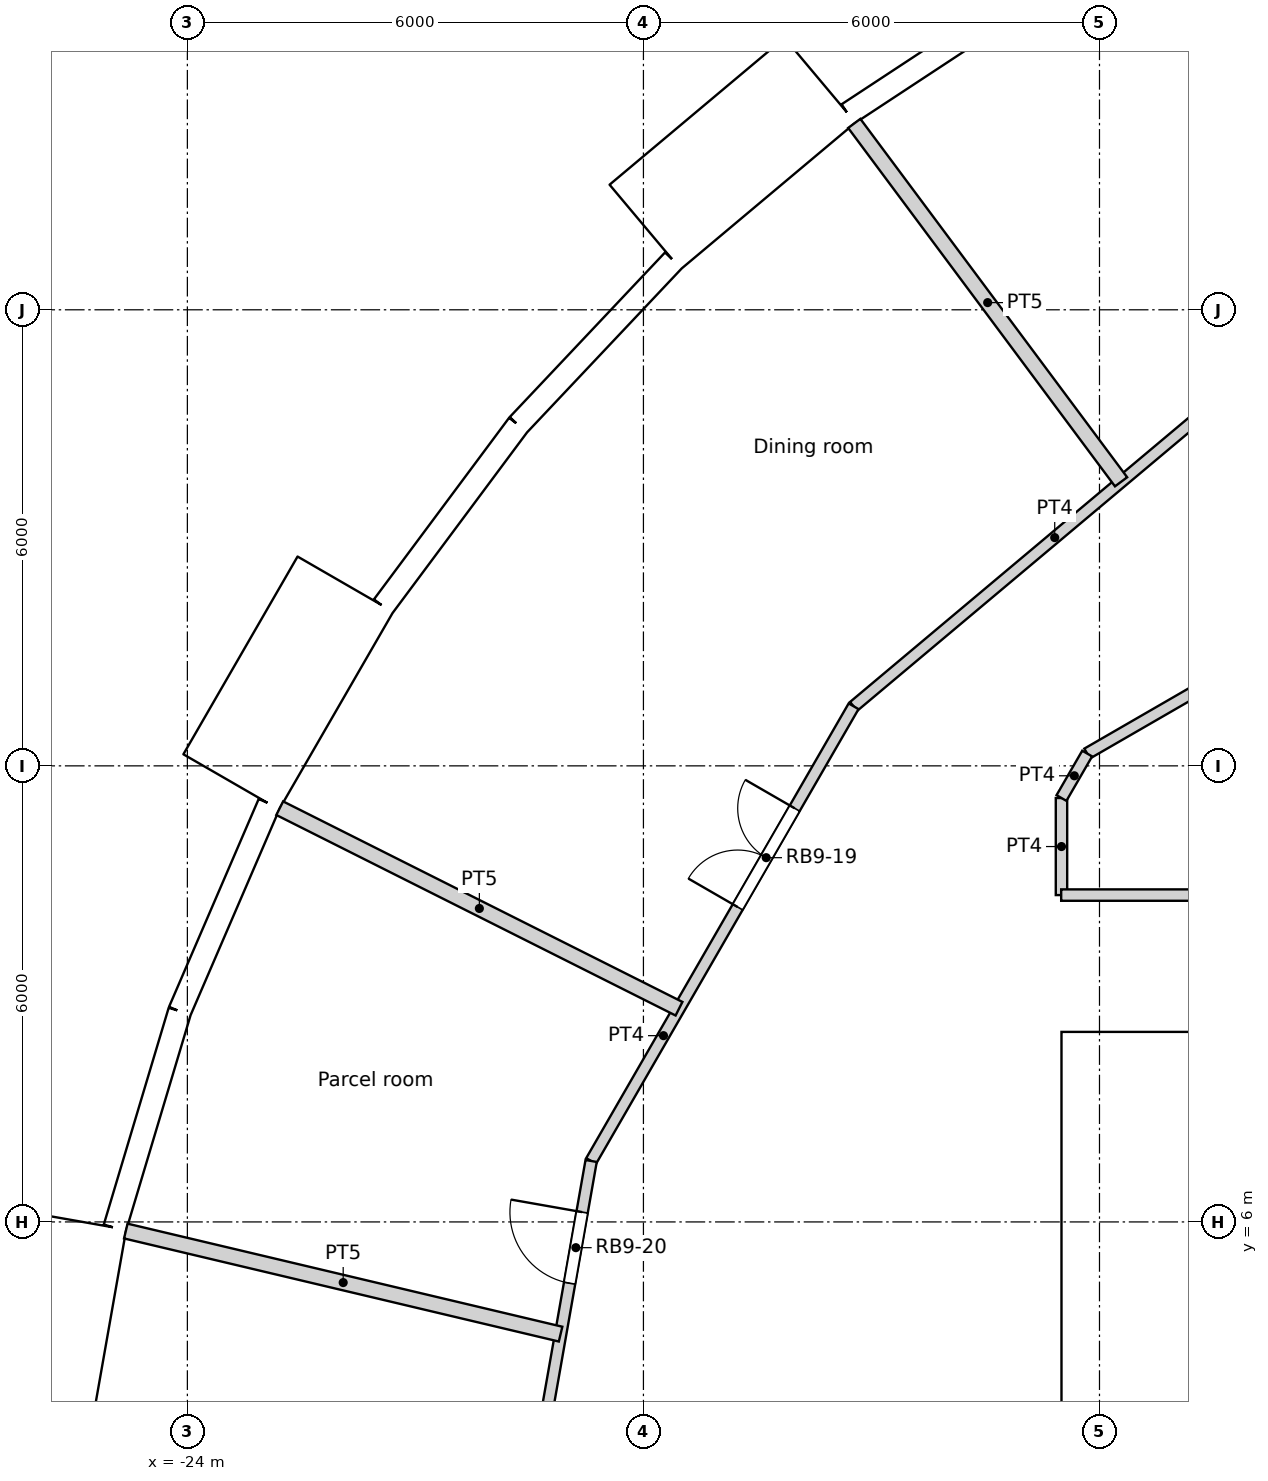
"""IFC4 building model, lengths in metres.
Left out: names, types, materials, properties, quantities, classifications, styles, units other than length and angle.
Written with IfcOpenShell. Run it as: python <this file> out.ifc"""

import sys

from ifc_helpers import new_model, si_unit, direction, frame, frame_2d, origin, origin_2d, place, context, subcontext, project, spatial, rectangle, circle, extrude, element, fill, save


model = new_model("IFC4")
c1 = context("Model", 3, precision=1e-05, world=origin(), true_north=direction((0.0, 1.0)))
c2 = subcontext(c1, "Body", "Model", "MODEL_VIEW")
j1 = project(units=[si_unit("LENGTHUNIT", "METRE"), si_unit("PLANEANGLEUNIT", "RADIAN")], contexts=[c1])
p1 = place(None, origin())
s1 = spatial("IfcSite", under=j1, at=p1, CompositionType="ELEMENT")
p2 = place(p1, origin())
s2 = spatial("IfcBuilding", under=s1, at=p2, CompositionType="ELEMENT")
p3 = place(p2, frame((0.0, 0.0, 212.4)))
s3 = spatial("IfcBuildingStorey", under=s2, at=p3, CompositionType="ELEMENT", Elevation=212.4)
for number, where, z_axis, x_axis in (
    (1, (-12.274, 21.259, 0.0), (0.0, 0.0, 1.0), (1.0, 0.0, 0.0)),
    (2, (-16.846, 17.855, 0.0), (0.0, 0.0, 1.0), (1.0, 0.0, 0.0)),
    (3, (-20.509, 13.489, 0.0), (0.0, 0.0, 1.0), (1.0, 0.0, 0.0)),
    (4, (-23.067, 8.396, 0.0), (0.0, 0.0, 1.0), (1.0, 0.0, 0.0)),
):
    element("IfcColumn", number, at=place(p3, frame(where, z_axis=z_axis, x_axis=x_axis)), inside=s3, PredefinedType="COLUMN", context=c2, shape_type="SweptSolid", body=[
        extrude(circle(Radius=0.6, at=origin_2d()), origin(), (0.0, 0.0, 1.0), 3.6),
    ])
for number, where, z_axis, x_axis in (
    (5, (-13.798, 12.802, 0.0), (0.0, 0.0, 1.0), (1.0, 0.0, 0.0)),
    (6, (-16.958, 8.167, 0.0), (0.0, 0.0, 1.0), (1.0, 0.0, 0.0)),
):
    element("IfcColumn", number, at=place(p3, frame(where, z_axis=z_axis, x_axis=x_axis)), inside=s3, PredefinedType="COLUMN", context=c2, shape_type="SweptSolid", body=[
        extrude(circle(Radius=0.65, at=origin_2d()), origin(), (0.0, 0.0, 1.0), 3.6),
    ])
p4 = place(p3, frame((-12.824, 22.211, 0.0), z_axis=(0.0, 0.0, 1.0), x_axis=(-0.835470659512, -0.549535055382, 0.0)))
e7 = element("IfcWall", 7, at=p4, inside=s3, PredefinedType="SOLIDWALL", context=c2, shape_type="SweptSolid", body=[
    extrude(rectangle(XDim=2.973, YDim=0.3, at=frame_2d((1.487, 0.0))), origin(), (0.0, 0.0, 1.0), 3.3),
])
p5 = place(p4, frame((1.486, 0.0, 1.55)))
e8 = element("IfcOpeningElement", 8, at=p5, cuts=e7, PredefinedType="OPENING", context=c2, shape_type="SweptSolid", body=[
    extrude(circle(Radius=0.9, at=origin_2d()), frame((0.0, 0.16, 0.0), z_axis=(0.0, -1.0, 0.0), x_axis=(1.0, 0.0, 0.0)), (0.0, 0.0, 1.0), 0.32),
])
p6 = place(p3, frame((-15.678, 21.019, -0.3), z_axis=(0.0, 0.0, 1.0), x_axis=(-0.766022196139, -0.642814121673, 0.0)))
e9 = element("IfcWall", 9, at=p6, inside=s3, PredefinedType="ELEMENTEDWALL", context=c2, shape_type="SweptSolid", body=[
    extrude(rectangle(XDim=3.0, YDim=1.45, at=frame_2d((1.5, 0.0))), origin(), (0.0, 0.0, 1.0), 3.6),
])
p7 = place(p6, frame((1.5, 0.0, 1.85)))
e10 = element("IfcOpeningElement", 10, at=p7, cuts=e9, PredefinedType="OPENING", context=c2, shape_type="SweptSolid", body=[
    extrude(circle(Radius=0.9, at=origin_2d()), frame((0.0, 0.735, 0.0), z_axis=(0.0, -1.0, 0.0), x_axis=(1.0, 0.0, 0.0)), (0.0, 0.0, 1.0), 1.47),
])
p8 = place(p3, frame((-17.607, 18.648, 0.0), z_axis=(0.0, 0.0, 1.0), x_axis=(-0.686235184166, -0.727379730273, 0.0)))
e11 = element("IfcWall", 11, at=p8, inside=s3, PredefinedType="SOLIDWALL", context=c2, shape_type="SweptSolid", body=[
    extrude(rectangle(XDim=2.973, YDim=0.3, at=frame_2d((1.486, 0.0))), origin(), (0.0, 0.0, 1.0), 3.3),
])
p9 = place(p8, frame((1.486, 0.0, 1.55)))
e12 = element("IfcOpeningElement", 12, at=p9, cuts=e11, PredefinedType="OPENING", context=c2, shape_type="SweptSolid", body=[
    extrude(circle(Radius=0.9, at=origin_2d()), frame((0.0, 0.16, 0.0), z_axis=(0.0, -1.0, 0.0), x_axis=(1.0, 0.0, 0.0)), (0.0, 0.0, 1.0), 0.32),
])
p10 = place(p3, frame((-19.647, 16.486, 0.0), z_axis=(0.0, 0.0, 1.0), x_axis=(-0.597197580538, -0.80209416517, 0.0)))
e13 = element("IfcWall", 13, at=p10, inside=s3, PredefinedType="SOLIDWALL", context=c2, shape_type="SweptSolid", body=[
    extrude(rectangle(XDim=2.973, YDim=0.3, at=frame_2d((1.486, 0.0))), origin(), (0.0, 0.0, 1.0), 3.3),
])
p11 = place(p10, frame((1.486, 0.0, 1.55)))
e14 = element("IfcOpeningElement", 14, at=p11, cuts=e13, PredefinedType="OPENING", context=c2, shape_type="SweptSolid", body=[
    extrude(circle(Radius=0.9, at=origin_2d()), frame((0.0, 0.16, 0.0), z_axis=(0.0, -1.0, 0.0), x_axis=(1.0, 0.0, 0.0)), (0.0, 0.0, 1.0), 0.32),
])
p12 = place(p3, frame((-21.922, 14.389, -0.3), z_axis=(0.0, 0.0, 1.0), x_axis=(-0.499990139034, -0.866031096941, 0.0)))
e15 = element("IfcWall", 15, at=p12, inside=s3, PredefinedType="ELEMENTEDWALL", context=c2, shape_type="SweptSolid", body=[
    extrude(rectangle(XDim=3.0, YDim=1.45, at=frame_2d((1.5, 0.0))), origin(), (0.0, 0.0, 1.0), 3.6),
])
p13 = place(p12, frame((1.5, 0.0, 1.85)))
e16 = element("IfcOpeningElement", 16, at=p13, cuts=e15, PredefinedType="OPENING", context=c2, shape_type="SweptSolid", body=[
    extrude(circle(Radius=0.9, at=origin_2d()), frame((0.0, 0.735, 0.0), z_axis=(0.0, -1.0, 0.0), x_axis=(1.0, 0.0, 0.0)), (0.0, 0.0, 1.0), 1.47),
])
p14 = place(p3, frame((-22.923, 11.502, 0.0), z_axis=(0.0, 0.0, 1.0), x_axis=(-0.396148129016, -0.918186614952, 0.0)))
e17 = element("IfcWall", 17, at=p14, inside=s3, PredefinedType="SOLIDWALL", context=c2, shape_type="SweptSolid", body=[
    extrude(rectangle(XDim=2.973, YDim=0.3, at=frame_2d((1.486, 0.0))), origin(), (0.0, 0.0, 1.0), 3.3),
])
p15 = place(p14, frame((1.486, 0.0, 1.55)))
e18 = element("IfcOpeningElement", 18, at=p15, cuts=e17, PredefinedType="OPENING", context=c2, shape_type="SweptSolid", body=[
    extrude(circle(Radius=0.9, at=origin_2d()), frame((0.0, 0.16, 0.0), z_axis=(0.0, -1.0, 0.0), x_axis=(1.0, 0.0, 0.0)), (0.0, 0.0, 1.0), 0.32),
])
p16 = place(p3, frame((-24.101, 8.772, 0.0), z_axis=(0.0, 0.0, 1.0), x_axis=(-0.286782750849, -0.957995643944, 0.0)))
e19 = element("IfcWall", 19, at=p16, inside=s3, PredefinedType="SOLIDWALL", context=c2, shape_type="SweptSolid", body=[
    extrude(rectangle(XDim=2.973, YDim=0.3, at=frame_2d((1.486, 0.0))), origin(), (0.0, 0.0, 1.0), 3.3),
])
p17 = place(p16, frame((1.486, 0.0, 1.55)))
e20 = element("IfcOpeningElement", 20, at=p17, cuts=e19, PredefinedType="OPENING", context=c2, shape_type="SweptSolid", body=[
    extrude(circle(Radius=0.9, at=origin_2d()), frame((0.0, 0.16, 0.0), z_axis=(0.0, -1.0, 0.0), x_axis=(1.0, 0.0, 0.0)), (0.0, 0.0, 1.0), 0.32),
])
p18 = place(p3, frame((-25.521, 6.023, -0.3), z_axis=(0.0, 0.0, 1.0), x_axis=(-0.173669267716, -0.984804034035, 0.0)))
e21 = element("IfcWall", 21, at=p18, inside=s3, PredefinedType="ELEMENTEDWALL", context=c2, shape_type="SweptSolid", body=[
    extrude(rectangle(XDim=3.0, YDim=1.45, at=frame_2d((1.5, 0.0))), origin(), (0.0, 0.0, 1.0), 3.6),
])
p19 = place(p18, frame((1.5, 0.0, 1.85)))
e22 = element("IfcOpeningElement", 22, at=p19, cuts=e21, PredefinedType="OPENING", context=c2, shape_type="SweptSolid", body=[
    extrude(circle(Radius=0.9, at=origin_2d()), frame((0.0, 0.735, 0.0), z_axis=(0.0, -1.0, 0.0), x_axis=(1.0, 0.0, 0.0)), (0.0, 0.0, 1.0), 1.47),
])
p20 = place(p3, frame((-12.5, 8.05, 0.0), z_axis=(0.0, 0.0, 1.0), x_axis=(1.0, 0.0, 0.0)))
e23 = element("IfcWall", 23, at=p20, inside=s3, PredefinedType="SOLIDWALL", context=c2, shape_type="SweptSolid", body=[
    extrude(rectangle(XDim=25.0, YDim=0.9, at=frame_2d((12.5, 0.0))), origin(), (0.0, 0.0, 1.0), 3.6),
])
p21 = place(p20, frame((8.3, 0.0, 0.0)))
e24 = element("IfcOpeningElement", 24, at=p21, cuts=e23, PredefinedType="OPENING", context=c2, shape_type="SweptSolid", body=[
    extrude(rectangle(XDim=1.8, YDim=2.1, at=frame_2d((0.9, 1.05))), frame((0.0, 0.45, 0.0), z_axis=(0.0, -1.0, 0.0), x_axis=(1.0, 0.0, 0.0)), (0.0, 0.0, 1.0), 0.9),
])
p22 = place(p3, frame((-12.05, -7.6, 0.0), z_axis=(0.0, 0.0, 1.0), x_axis=(0.0, 1.0, 0.0)))
e25 = element("IfcWall", 25, at=p22, inside=s3, PredefinedType="SOLIDWALL", context=c2, shape_type="SweptSolid", body=[
    extrude(rectangle(XDim=15.2, YDim=0.9, at=frame_2d((7.6, 0.0))), origin(), (0.0, 0.0, 1.0), 3.6),
])
p23 = place(p22, frame((7.1, 0.0, 0.0)))
e26 = element("IfcOpeningElement", 26, at=p23, cuts=e25, PredefinedType="OPENING", context=c2, shape_type="SweptSolid", body=[
    extrude(rectangle(XDim=1.0, YDim=2.1, at=frame_2d((0.5, 1.05))), frame((0.0, 0.45, 0.0), z_axis=(0.0, -1.0, 0.0), x_axis=(1.0, 0.0, 0.0)), (0.0, 0.0, 1.0), 0.9),
])
p24 = place(p3, frame((-11.6, 4.55, 0.0), z_axis=(0.0, 0.0, 1.0), x_axis=(1.0, 0.0, 0.0)))
e27 = element("IfcWall", 27, at=p24, inside=s3, PredefinedType="SOLIDWALL", context=c2, shape_type="SweptSolid", body=[
    extrude(rectangle(XDim=2.4, YDim=0.3, at=frame_2d((1.2, 0.0))), origin(), (0.0, 0.0, 1.0), 3.3),
])
p25 = place(p24, frame((0.65, 0.0, 0.0)))
e28 = element("IfcOpeningElement", 28, at=p25, cuts=e27, PredefinedType="OPENING", context=c2, shape_type="SweptSolid", body=[
    extrude(rectangle(XDim=1.1, YDim=2.1, at=frame_2d((0.55, 1.05))), frame((0.0, 0.15, 0.0), z_axis=(0.0, -1.0, 0.0), x_axis=(1.0, 0.0, 0.0)), (0.0, 0.0, 1.0), 0.3),
])
p26 = place(p3, frame((-12.504, 10.3, 0.0), z_axis=(0.0, 0.0, 1.0), x_axis=(1.0, 0.0, 0.0)))
e29 = element("IfcWall", 29, at=p26, inside=s3, PredefinedType="PARTITIONING", context=c2, shape_type="SweptSolid", body=[
    extrude(rectangle(XDim=7.687, YDim=0.15, at=frame_2d((3.844, 0.0))), origin(), (0.0, 0.0, 1.0), 3.15),
])
p27 = place(p3, frame((-12.162, 12.162, 0.0), z_axis=(0.0, 0.0, 1.0), x_axis=(0.866004766557, 0.500035743023, 0.0)))
e30 = element("IfcWall", 30, at=p27, inside=s3, PredefinedType="PARTITIONING", context=c2, shape_type="SweptSolid", body=[
    extrude(rectangle(XDim=8.477, YDim=0.15, at=frame_2d((4.239, 0.0))), origin(), (0.0, 0.0, 1.0), 3.15),
])
p28 = place(p27, frame((3.739, 0.0, 0.0)))
e31 = element("IfcOpeningElement", 31, at=p28, cuts=e30, PredefinedType="OPENING", context=c2, shape_type="SweptSolid", body=[
    extrude(rectangle(XDim=1.0, YDim=2.04, at=frame_2d((0.5, 1.02))), frame((0.0, 0.075, 0.0), z_axis=(0.0, -1.0, 0.0), x_axis=(1.0, 0.0, 0.0)), (0.0, 0.0, 1.0), 0.15),
])
p29 = place(p3, frame((-15.234, 12.783, 0.0), z_axis=(0.0, 0.0, 1.0), x_axis=(0.765936018543, 0.642916802937, 0.0)))
e32 = element("IfcWall", 32, at=p29, inside=s3, PredefinedType="PARTITIONING", context=c2, shape_type="SweptSolid", body=[
    extrude(rectangle(XDim=6.906, YDim=0.15, at=frame_2d((3.453, 0.0))), origin(), (0.0, 0.0, 1.0), 3.15),
])
p30 = place(p3, frame((-12.5, 11.577, 0.0), z_axis=(0.0, 0.0, 1.0), x_axis=(0.500024767483, 0.866011103799, 0.0)))
e33 = element("IfcWall", 33, at=p30, inside=s3, PredefinedType="PARTITIONING", context=c2, shape_type="SweptSolid", body=[
    extrude(rectangle(XDim=0.676, YDim=0.15, at=frame_2d((0.338, 0.0))), origin(), (0.0, 0.0, 1.0), 3.15),
])
p31 = place(p3, frame((-12.5, 10.3, 0.0), z_axis=(0.0, 0.0, 1.0), x_axis=(0.0, 1.0, 0.0)))
e34 = element("IfcWall", 34, at=p31, inside=s3, PredefinedType="PARTITIONING", context=c2, shape_type="SweptSolid", body=[
    extrude(rectangle(XDim=1.277, YDim=0.15, at=frame_2d((0.638, 0.0))), origin(), (0.0, 0.0, 1.0), 3.15),
])
p32 = place(p3, frame((-18.688, 6.802, 0.0), z_axis=(0.0, 0.0, 1.0), x_axis=(0.499914202267, 0.866074933462, 0.0)))
e35 = element("IfcWall", 35, at=p32, inside=s3, PredefinedType="PARTITIONING", context=c2, shape_type="SweptSolid", body=[
    extrude(rectangle(XDim=6.907, YDim=0.15, at=frame_2d((3.454, 0.0))), origin(), (0.0, 0.0, 1.0), 3.15),
])
p33 = place(p32, frame((3.857, 0.0, 0.0)))
e36 = element("IfcOpeningElement", 36, at=p33, cuts=e35, PredefinedType="OPENING", context=c2, shape_type="SweptSolid", body=[
    extrude(rectangle(XDim=1.5, YDim=2.1, at=frame_2d((0.75, 1.05))), frame((0.0, 0.075, 0.0), z_axis=(0.0, -1.0, 0.0), x_axis=(1.0, 0.0, 0.0)), (0.0, 0.0, 1.0), 0.15),
])
p34 = place(p3, frame((-19.886, -0.0, 0.0), z_axis=(0.0, 0.0, 1.0), x_axis=(0.173482860149, 0.984836888644, 0.0)))
e37 = element("IfcWall", 37, at=p34, inside=s3, PredefinedType="PARTITIONING", context=c2, shape_type="SweptSolid", body=[
    extrude(rectangle(XDim=6.907, YDim=0.15, at=frame_2d((3.454, 0.0))), origin(), (0.0, 0.0, 1.0), 3.15),
])
p35 = place(p34, frame((5.274, 0.0, 0.0)))
e38 = element("IfcOpeningElement", 38, at=p35, cuts=e37, PredefinedType="OPENING", context=c2, shape_type="SweptSolid", body=[
    extrude(rectangle(XDim=0.95, YDim=2.1, at=frame_2d((0.475, 1.05))), frame((0.0, 0.075, 0.0), z_axis=(0.0, -1.0, 0.0), x_axis=(1.0, 0.0, 0.0)), (0.0, 0.0, 1.0), 0.15),
])
p36 = place(p3, frame((-15.226, 20.452, 0.0), z_axis=(0.0, 0.0, 1.0), x_axis=(0.597151875745, -0.802128192557, 0.0)))
e39 = element("IfcWall", 39, at=p36, inside=s3, PredefinedType="PARTITIONING", context=c2, shape_type="SweptSolid", body=[
    extrude(rectangle(XDim=5.878, YDim=0.2, at=frame_2d((2.939, 0.0))), origin(), (0.0, 0.0, 1.0), 3.15),
])
p37 = place(p3, frame((-22.785, 11.443, 0.0), z_axis=(0.0, 0.0, 1.0), x_axis=(0.893628331628, -0.448807759415, 0.0)))
e40 = element("IfcWall", 40, at=p37, inside=s3, PredefinedType="PARTITIONING", context=c2, shape_type="SweptSolid", body=[
    extrude(rectangle(XDim=5.878, YDim=0.2, at=frame_2d((2.939, 0.0))), origin(), (0.0, 0.0, 1.0), 3.15),
])
p38 = place(p3, frame((-24.81, 5.88, 0.0), z_axis=(0.0, 0.0, 1.0), x_axis=(0.973033452951, -0.230664040193, 0.0)))
e41 = element("IfcWall", 41, at=p38, inside=s3, PredefinedType="PARTITIONING", context=c2, shape_type="SweptSolid", body=[
    extrude(rectangle(XDim=5.878, YDim=0.2, at=frame_2d((2.939, 0.0))), origin(), (0.0, 0.0, 1.0), 3.15),
])
p39 = place(p5, origin())
e42 = element("IfcWindow", 42, at=p39, inside=s3, PartitioningType="SINGLE_PANEL", PredefinedType="WINDOW", context=c2, shape_type="SweptSolid", body=[
    extrude(circle(Radius=0.9, at=origin_2d()), frame((0.0, 0.12, 0.0), z_axis=(0.0, -1.0, 0.0), x_axis=(1.0, 0.0, 0.0)), (0.0, 0.0, 1.0), 0.1),
])
fill(e8, e42)
p40 = place(p7, origin())
e43 = element("IfcWindow", 43, at=p40, inside=s3, PartitioningType="SINGLE_PANEL", PredefinedType="WINDOW", context=c2, shape_type="SweptSolid", body=[
    extrude(circle(Radius=0.9, at=origin_2d()), frame((0.0, 0.695, 0.0), z_axis=(0.0, -1.0, 0.0), x_axis=(1.0, 0.0, 0.0)), (0.0, 0.0, 1.0), 0.1),
])
fill(e10, e43)
p41 = place(p9, origin())
e44 = element("IfcWindow", 44, at=p41, inside=s3, PartitioningType="SINGLE_PANEL", PredefinedType="WINDOW", context=c2, shape_type="SweptSolid", body=[
    extrude(circle(Radius=0.9, at=origin_2d()), frame((0.0, 0.12, 0.0), z_axis=(0.0, -1.0, 0.0), x_axis=(1.0, 0.0, 0.0)), (0.0, 0.0, 1.0), 0.1),
])
fill(e12, e44)
p42 = place(p11, origin())
e45 = element("IfcWindow", 45, at=p42, inside=s3, PartitioningType="SINGLE_PANEL", PredefinedType="WINDOW", context=c2, shape_type="SweptSolid", body=[
    extrude(circle(Radius=0.9, at=origin_2d()), frame((0.0, 0.12, 0.0), z_axis=(0.0, -1.0, 0.0), x_axis=(1.0, 0.0, 0.0)), (0.0, 0.0, 1.0), 0.1),
])
fill(e14, e45)
p43 = place(p13, origin())
e46 = element("IfcWindow", 46, at=p43, inside=s3, PartitioningType="SINGLE_PANEL", PredefinedType="WINDOW", context=c2, shape_type="SweptSolid", body=[
    extrude(circle(Radius=0.9, at=origin_2d()), frame((0.0, 0.695, 0.0), z_axis=(0.0, -1.0, 0.0), x_axis=(1.0, 0.0, 0.0)), (0.0, 0.0, 1.0), 0.1),
])
fill(e16, e46)
p44 = place(p15, origin())
e47 = element("IfcWindow", 47, at=p44, inside=s3, PartitioningType="SINGLE_PANEL", PredefinedType="WINDOW", context=c2, shape_type="SweptSolid", body=[
    extrude(circle(Radius=0.9, at=origin_2d()), frame((0.0, 0.12, 0.0), z_axis=(0.0, -1.0, 0.0), x_axis=(1.0, 0.0, 0.0)), (0.0, 0.0, 1.0), 0.1),
])
fill(e18, e47)
p45 = place(p17, origin())
e48 = element("IfcWindow", 48, at=p45, inside=s3, PartitioningType="SINGLE_PANEL", PredefinedType="WINDOW", context=c2, shape_type="SweptSolid", body=[
    extrude(circle(Radius=0.9, at=origin_2d()), frame((0.0, 0.12, 0.0), z_axis=(0.0, -1.0, 0.0), x_axis=(1.0, 0.0, 0.0)), (0.0, 0.0, 1.0), 0.1),
])
fill(e20, e48)
p46 = place(p19, origin())
e49 = element("IfcWindow", 49, at=p46, inside=s3, PartitioningType="SINGLE_PANEL", PredefinedType="WINDOW", context=c2, shape_type="SweptSolid", body=[
    extrude(circle(Radius=0.9, at=origin_2d()), frame((0.0, 0.695, 0.0), z_axis=(0.0, -1.0, 0.0), x_axis=(1.0, 0.0, 0.0)), (0.0, 0.0, 1.0), 0.1),
])
fill(e22, e49)
p47 = place(p25, origin())
e50 = element("IfcDoor", 50, at=p47, inside=s3, OperationType="SLIDING_TO_LEFT", PredefinedType="DOOR", context=c2, shape_type="SweptSolid", body=[
    extrude(rectangle(XDim=1.1, YDim=2.1, at=frame_2d((0.55, 1.05))), frame((0.0, 0.025, 0.0), z_axis=(0.0, -1.0, 0.0), x_axis=(1.0, 0.0, 0.0)), (0.0, 0.0, 1.0), 0.05),
])
fill(e28, e50)
p48 = place(p33, origin())
e51 = element("IfcDoor", 51, at=p48, inside=s3, OperationType="DOUBLE_DOOR_SINGLE_SWING", PredefinedType="DOOR", context=c2, shape_type="SweptSolid", body=[
    extrude(rectangle(XDim=1.5, YDim=2.1, at=frame_2d((0.75, 1.05))), frame((0.0, 0.025, 0.0), z_axis=(0.0, -1.0, 0.0), x_axis=(1.0, 0.0, 0.0)), (0.0, 0.0, 1.0), 0.05),
])
fill(e36, e51)
p49 = place(p35, origin())
e52 = element("IfcDoor", 52, at=p49, inside=s3, OperationType="SINGLE_SWING_RIGHT", PredefinedType="DOOR", context=c2, shape_type="SweptSolid", body=[
    extrude(rectangle(XDim=0.95, YDim=2.1, at=frame_2d((0.475, 1.05))), frame((0.0, 0.025, 0.0), z_axis=(0.0, -1.0, 0.0), x_axis=(1.0, 0.0, 0.0)), (0.0, 0.0, 1.0), 0.05),
])
fill(e38, e52)
save(model, sys.argv[1])
